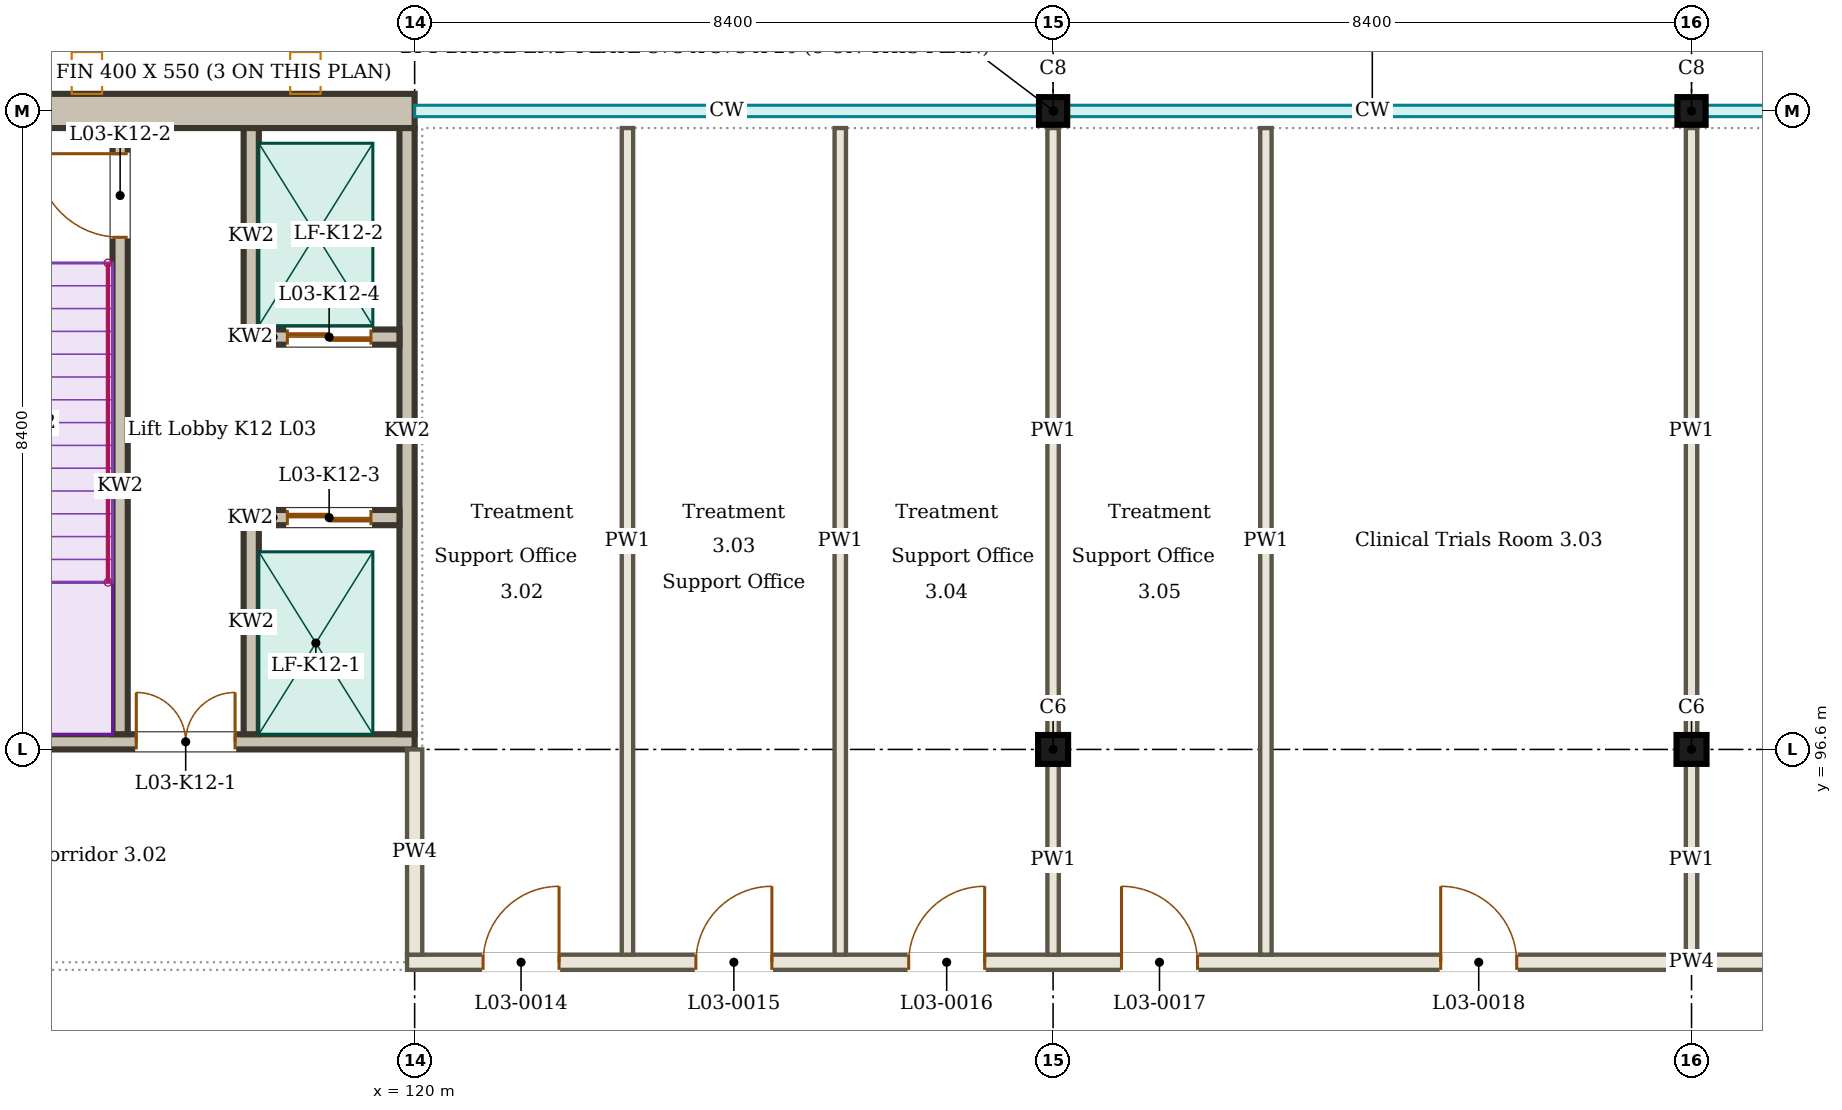
"""IFC4 building model, lengths in metres.
Left out: names, types, materials, properties, quantities, classifications, styles, units other than length and angle.
Written with IfcOpenShell. Run it as: python <this file> out.ifc"""

import sys

from ifc_helpers import new_model, si_unit, direction, frame, frame_2d, origin, origin_2d, place, context, subcontext, project, spatial, rectangle, i_section, extrude, element, fill, save


model = new_model("IFC4")
c1 = context("Model", 3, precision=1e-05, world=origin(), true_north=direction((0.0, 1.0)))
c2 = subcontext(c1, "Body", "Model", "MODEL_VIEW")
j1 = project(units=[si_unit("LENGTHUNIT", "METRE"), si_unit("PLANEANGLEUNIT", "RADIAN")], contexts=[c1])
p1 = place(None, origin())
s1 = spatial("IfcSite", under=j1, at=p1, CompositionType="ELEMENT")
p2 = place(p1, origin())
s2 = spatial("IfcBuilding", under=s1, at=p2, CompositionType="ELEMENT")
p3 = place(p2, frame((0.0, 0.0, 13.5)))
s3 = spatial("IfcBuildingStorey", under=s2, at=p3, CompositionType="ELEMENT", Elevation=13.5)
for number, where, z_axis, x_axis in (
    (1, (128.4, 96.6, 0.0), (0.0, 0.0, 1.0), (1.0, 0.0, 0.0)),
    (2, (136.8, 96.6, 0.0), (0.0, 0.0, 1.0), (1.0, 0.0, 0.0)),
):
    element("IfcColumn", number, at=place(p3, frame(where, z_axis=z_axis, x_axis=x_axis)), inside=s3, PredefinedType="COLUMN", context=c2, shape_type="SweptSolid", body=[
        extrude(i_section(OverallWidth=0.395, OverallDepth=0.38, WebThickness=0.019, FlangeThickness=0.03, FilletRadius=0.027, at=origin_2d()), origin(), (0.0, 0.0, 1.0), 4.5),
    ])
for number, where, z_axis, x_axis in (
    (3, (128.4, 105.0, 0.0), (0.0, 0.0, 1.0), (1.0, 0.0, 0.0)),
    (4, (136.8, 105.0, 0.0), (0.0, 0.0, 1.0), (1.0, 0.0, 0.0)),
):
    element("IfcColumn", number, at=place(p3, frame(where, z_axis=z_axis, x_axis=x_axis)), inside=s3, PredefinedType="COLUMN", context=c2, shape_type="SweptSolid", body=[
        extrude(i_section(OverallWidth=0.371, OverallDepth=0.364, WebThickness=0.013, FlangeThickness=0.022, FilletRadius=0.027, at=origin_2d()), origin(), (0.0, 0.0, 1.0), 4.5),
    ])
p4 = place(p3, frame((136.8, 105.16, 3.87), z_axis=(0.0, 0.0, 1.0), x_axis=(1.0, 0.0, 0.0)))
e5 = element("IfcWall", 5, at=p4, inside=s3, PredefinedType="SOLIDWALL", context=c2, shape_type="SweptSolid", body=[
    extrude(rectangle(XDim=8.4, YDim=0.13, at=frame_2d((4.2, 0.0))), origin(), (0.0, 0.0, 1.0), 0.63),
])
p5 = place(p3, frame((119.9, 93.8, 0.0), z_axis=(0.0, 0.0, 1.0), x_axis=(1.0, 0.0, 0.0)))
e6 = element("IfcWall", 6, at=p5, inside=s3, PredefinedType="PARTITIONING", context=c2, shape_type="SweptSolid", body=[
    extrude(rectangle(XDim=22.6, YDim=0.2, at=frame_2d((11.3, 0.0))), origin(), (0.0, 0.0, 1.0), 3.8),
])
p6 = place(p5, frame((1.0, 0.0, 0.0)))
e7 = element("IfcOpeningElement", 7, at=p6, cuts=e6, PredefinedType="OPENING", context=c2, shape_type="SweptSolid", body=[
    extrude(rectangle(XDim=1.0, YDim=2.1, at=frame_2d((0.5, 1.05))), frame((0.0, 0.11, 0.0), z_axis=(0.0, -1.0, 0.0), x_axis=(1.0, 0.0, 0.0)), (0.0, 0.0, 1.0), 0.22),
])
p7 = place(p5, frame((3.8, 0.0, 0.0)))
e8 = element("IfcOpeningElement", 8, at=p7, cuts=e6, PredefinedType="OPENING", context=c2, shape_type="SweptSolid", body=[
    extrude(rectangle(XDim=1.0, YDim=2.1, at=frame_2d((0.5, 1.05))), frame((0.0, 0.11, 0.0), z_axis=(0.0, -1.0, 0.0), x_axis=(1.0, 0.0, 0.0)), (0.0, 0.0, 1.0), 0.22),
])
p8 = place(p5, frame((6.6, 0.0, 0.0)))
e9 = element("IfcOpeningElement", 9, at=p8, cuts=e6, PredefinedType="OPENING", context=c2, shape_type="SweptSolid", body=[
    extrude(rectangle(XDim=1.0, YDim=2.1, at=frame_2d((0.5, 1.05))), frame((0.0, 0.11, 0.0), z_axis=(0.0, -1.0, 0.0), x_axis=(1.0, 0.0, 0.0)), (0.0, 0.0, 1.0), 0.22),
])
p9 = place(p5, frame((9.4, 0.0, 0.0)))
e10 = element("IfcOpeningElement", 10, at=p9, cuts=e6, PredefinedType="OPENING", context=c2, shape_type="SweptSolid", body=[
    extrude(rectangle(XDim=1.0, YDim=2.1, at=frame_2d((0.5, 1.05))), frame((0.0, 0.11, 0.0), z_axis=(0.0, -1.0, 0.0), x_axis=(1.0, 0.0, 0.0)), (0.0, 0.0, 1.0), 0.22),
])
p10 = place(p5, frame((13.6, 0.0, 0.0)))
e11 = element("IfcOpeningElement", 11, at=p10, cuts=e6, PredefinedType="OPENING", context=c2, shape_type="SweptSolid", body=[
    extrude(rectangle(XDim=1.0, YDim=2.1, at=frame_2d((0.5, 1.05))), frame((0.0, 0.11, 0.0), z_axis=(0.0, -1.0, 0.0), x_axis=(1.0, 0.0, 0.0)), (0.0, 0.0, 1.0), 0.22),
])
p11 = place(p5, frame((19.2, 0.0, 0.0)))
e12 = element("IfcOpeningElement", 12, at=p11, cuts=e6, PredefinedType="OPENING", context=c2, shape_type="SweptSolid", body=[
    extrude(rectangle(XDim=1.0, YDim=2.1, at=frame_2d((0.5, 1.05))), frame((0.0, 0.11, 0.0), z_axis=(0.0, -1.0, 0.0), x_axis=(1.0, 0.0, 0.0)), (0.0, 0.0, 1.0), 0.22),
])
p12 = place(p3, frame((120.0, 93.9, 0.0), z_axis=(0.0, 0.0, 1.0), x_axis=(0.0, 1.0, 0.0)))
e13 = element("IfcWall", 13, at=p12, inside=s3, PredefinedType="PARTITIONING", context=c2, shape_type="SweptSolid", body=[
    extrude(rectangle(XDim=2.7, YDim=0.2, at=frame_2d((1.35, 0.0))), origin(), (0.0, 0.0, 1.0), 3.8),
])
for number, where, z_axis, x_axis in (
    (14, (122.8, 93.9, 0.0), (0.0, 0.0, 1.0), (0.0, 1.0, 0.0)),
    (15, (125.6, 93.9, 0.0), (0.0, 0.0, 1.0), (0.0, 1.0, 0.0)),
):
    element("IfcWall", number, at=place(p3, frame(where, z_axis=z_axis, x_axis=x_axis)), inside=s3, PredefinedType="PARTITIONING", context=c2, shape_type="SweptSolid", body=[
        extrude(rectangle(XDim=10.875, YDim=0.15, at=frame_2d((5.438, 0.0))), origin(), (0.0, 0.0, 1.0), 3.8),
    ])
p13 = place(p3, frame((128.4, 93.9, 0.0), z_axis=(0.0, 0.0, 1.0), x_axis=(0.0, 1.0, 0.0)))
e16 = element("IfcWall", 16, at=p13, inside=s3, PredefinedType="PARTITIONING", context=c2, shape_type="SweptSolid", body=[
    extrude(rectangle(XDim=2.503, YDim=0.15, at=frame_2d((1.251, 0.0))), origin(), (0.0, 0.0, 1.0), 3.8),
])
p14 = place(p3, frame((128.4, 96.798, 0.0), z_axis=(0.0, 0.0, 1.0), x_axis=(0.0, 1.0, 0.0)))
e17 = element("IfcWall", 17, at=p14, inside=s3, PredefinedType="PARTITIONING", context=c2, shape_type="SweptSolid", body=[
    extrude(rectangle(XDim=7.977, YDim=0.15, at=frame_2d((3.989, 0.0))), origin(), (0.0, 0.0, 1.0), 3.8),
])
p15 = place(p3, frame((131.2, 93.9, 0.0), z_axis=(0.0, 0.0, 1.0), x_axis=(0.0, 1.0, 0.0)))
e18 = element("IfcWall", 18, at=p15, inside=s3, PredefinedType="PARTITIONING", context=c2, shape_type="SweptSolid", body=[
    extrude(rectangle(XDim=10.875, YDim=0.15, at=frame_2d((5.438, 0.0))), origin(), (0.0, 0.0, 1.0), 3.8),
])
p16 = place(p3, frame((136.8, 93.9, 0.0), z_axis=(0.0, 0.0, 1.0), x_axis=(0.0, 1.0, 0.0)))
e19 = element("IfcWall", 19, at=p16, inside=s3, PredefinedType="PARTITIONING", context=c2, shape_type="SweptSolid", body=[
    extrude(rectangle(XDim=2.503, YDim=0.15, at=frame_2d((1.251, 0.0))), origin(), (0.0, 0.0, 1.0), 3.8),
])
p17 = place(p3, frame((136.8, 96.798, 0.0), z_axis=(0.0, 0.0, 1.0), x_axis=(0.0, 1.0, 0.0)))
e20 = element("IfcWall", 20, at=p17, inside=s3, PredefinedType="PARTITIONING", context=c2, shape_type="SweptSolid", body=[
    extrude(rectangle(XDim=7.977, YDim=0.15, at=frame_2d((3.989, 0.0))), origin(), (0.0, 0.0, 1.0), 3.8),
])
p18 = place(p3, frame((111.825, 96.7, 0.0), z_axis=(0.0, 0.0, 1.0), x_axis=(1.0, 0.0, 0.0)))
e21 = element("IfcWall", 21, at=p18, inside=s3, PredefinedType="SOLIDWALL", context=c2, shape_type="SweptSolid", body=[
    extrude(rectangle(XDim=8.175, YDim=0.2, at=frame_2d((4.087, 0.0))), origin(), (0.0, 0.0, 1.0), 4.5),
])
p19 = place(p18, frame((4.512, 0.0, 0.0)))
e22 = element("IfcOpeningElement", 22, at=p19, cuts=e21, PredefinedType="OPENING", context=c2, shape_type="SweptSolid", body=[
    extrude(rectangle(XDim=1.3, YDim=2.1, at=frame_2d((0.65, 1.05))), frame((0.0, 0.11, 0.0), z_axis=(0.0, -1.0, 0.0), x_axis=(1.0, 0.0, 0.0)), (0.0, 0.0, 1.0), 0.22),
])
p20 = place(p3, frame((111.375, 105.0, 0.0), z_axis=(0.0, 0.0, 1.0), x_axis=(1.0, 0.0, 0.0)))
e23 = element("IfcWall", 23, at=p20, inside=s3, PredefinedType="SOLIDWALL", context=c2, shape_type="SweptSolid", body=[
    extrude(rectangle(XDim=8.625, YDim=0.45, at=frame_2d((4.312, 0.0))), origin(), (0.0, 0.0, 1.0), 4.5),
])
p21 = place(p3, frame((119.9, 96.8, 0.0), z_axis=(0.0, 0.0, 1.0), x_axis=(0.0, 1.0, 0.0)))
e24 = element("IfcWall", 24, at=p21, inside=s3, PredefinedType="SOLIDWALL", context=c2, shape_type="SweptSolid", body=[
    extrude(rectangle(XDim=7.975, YDim=0.2, at=frame_2d((3.987, 0.0))), origin(), (0.0, 0.0, 1.0), 4.5),
])
p22 = place(p3, frame((116.125, 96.8, 0.0), z_axis=(0.0, 0.0, 1.0), x_axis=(0.0, 1.0, 0.0)))
e25 = element("IfcWall", 25, at=p22, inside=s3, PredefinedType="SOLIDWALL", context=c2, shape_type="SweptSolid", body=[
    extrude(rectangle(XDim=7.975, YDim=0.2, at=frame_2d((3.987, 0.0))), origin(), (0.0, 0.0, 1.0), 4.5),
])
p23 = place(p22, frame((6.538, 0.0, 0.0)))
e26 = element("IfcOpeningElement", 26, at=p23, cuts=e25, PredefinedType="OPENING", context=c2, shape_type="SweptSolid", body=[
    extrude(rectangle(XDim=1.1, YDim=2.1, at=frame_2d((0.55, 1.05))), frame((0.0, 0.11, 0.0), z_axis=(0.0, -1.0, 0.0), x_axis=(1.0, 0.0, 0.0)), (0.0, 0.0, 1.0), 0.22),
])
p24 = place(p3, frame((117.85, 96.8, 0.0), z_axis=(0.0, 0.0, 1.0), x_axis=(0.0, 1.0, 0.0)))
e27 = element("IfcWall", 27, at=p24, inside=s3, PredefinedType="SOLIDWALL", context=c2, shape_type="SweptSolid", body=[
    extrude(rectangle(XDim=2.95, YDim=0.2, at=frame_2d((1.475, 0.0))), origin(), (0.0, 0.0, 1.0), 4.5),
])
p25 = place(p3, frame((117.85, 101.925, 0.0), z_axis=(0.0, 0.0, 1.0), x_axis=(0.0, 1.0, 0.0)))
e28 = element("IfcWall", 28, at=p25, inside=s3, PredefinedType="SOLIDWALL", context=c2, shape_type="SweptSolid", body=[
    extrude(rectangle(XDim=2.85, YDim=0.2, at=frame_2d((1.425, 0.0))), origin(), (0.0, 0.0, 1.0), 4.5),
])
p26 = place(p3, frame((117.95, 99.65, 0.0), z_axis=(0.0, 0.0, 1.0), x_axis=(1.0, 0.0, 0.0)))
e29 = element("IfcWall", 29, at=p26, inside=s3, PredefinedType="SOLIDWALL", context=c2, shape_type="SweptSolid", body=[
    extrude(rectangle(XDim=1.85, YDim=0.2, at=frame_2d((0.925, 0.0))), origin(), (0.0, 0.0, 1.0), 4.5),
])
p27 = place(p26, frame((0.375, 0.0, 0.0)))
e30 = element("IfcOpeningElement", 30, at=p27, cuts=e29, PredefinedType="OPENING", context=c2, shape_type="SweptSolid", body=[
    extrude(rectangle(XDim=1.1, YDim=2.1, at=frame_2d((0.55, 1.05))), frame((0.0, 0.11, 0.0), z_axis=(0.0, -1.0, 0.0), x_axis=(1.0, 0.0, 0.0)), (0.0, 0.0, 1.0), 0.22),
])
p28 = place(p3, frame((117.95, 102.025, 0.0), z_axis=(0.0, 0.0, 1.0), x_axis=(1.0, 0.0, 0.0)))
e31 = element("IfcWall", 31, at=p28, inside=s3, PredefinedType="SOLIDWALL", context=c2, shape_type="SweptSolid", body=[
    extrude(rectangle(XDim=1.85, YDim=0.2, at=frame_2d((0.925, 0.0))), origin(), (0.0, 0.0, 1.0), 4.5),
])
p29 = place(p28, frame((0.375, 0.0, 0.0)))
e32 = element("IfcOpeningElement", 32, at=p29, cuts=e31, PredefinedType="OPENING", context=c2, shape_type="SweptSolid", body=[
    extrude(rectangle(XDim=1.1, YDim=2.1, at=frame_2d((0.55, 1.05))), frame((0.0, 0.11, 0.0), z_axis=(0.0, -1.0, 0.0), x_axis=(1.0, 0.0, 0.0)), (0.0, 0.0, 1.0), 0.22),
])
p30 = place(p6, origin())
e33 = element("IfcDoor", 33, at=p30, inside=s3, OperationType="SINGLE_SWING_RIGHT", PredefinedType="DOOR", context=c2, shape_type="SweptSolid", body=[
    extrude(rectangle(XDim=1.0, YDim=2.1, at=frame_2d((0.5, 1.05))), frame((0.0, 0.025, 0.0), z_axis=(0.0, -1.0, 0.0), x_axis=(1.0, 0.0, 0.0)), (0.0, 0.0, 1.0), 0.05),
])
fill(e7, e33)
p31 = place(p7, origin())
e34 = element("IfcDoor", 34, at=p31, inside=s3, OperationType="SINGLE_SWING_RIGHT", PredefinedType="DOOR", context=c2, shape_type="SweptSolid", body=[
    extrude(rectangle(XDim=1.0, YDim=2.1, at=frame_2d((0.5, 1.05))), frame((0.0, 0.025, 0.0), z_axis=(0.0, -1.0, 0.0), x_axis=(1.0, 0.0, 0.0)), (0.0, 0.0, 1.0), 0.05),
])
fill(e8, e34)
p32 = place(p8, origin())
e35 = element("IfcDoor", 35, at=p32, inside=s3, OperationType="SINGLE_SWING_RIGHT", PredefinedType="DOOR", context=c2, shape_type="SweptSolid", body=[
    extrude(rectangle(XDim=1.0, YDim=2.1, at=frame_2d((0.5, 1.05))), frame((0.0, 0.025, 0.0), z_axis=(0.0, -1.0, 0.0), x_axis=(1.0, 0.0, 0.0)), (0.0, 0.0, 1.0), 0.05),
])
fill(e9, e35)
p33 = place(p9, origin())
e36 = element("IfcDoor", 36, at=p33, inside=s3, OperationType="SINGLE_SWING_LEFT", PredefinedType="DOOR", context=c2, shape_type="SweptSolid", body=[
    extrude(rectangle(XDim=1.0, YDim=2.1, at=frame_2d((0.5, 1.05))), frame((0.0, 0.025, 0.0), z_axis=(0.0, -1.0, 0.0), x_axis=(1.0, 0.0, 0.0)), (0.0, 0.0, 1.0), 0.05),
])
fill(e10, e36)
p34 = place(p10, origin())
e37 = element("IfcDoor", 37, at=p34, inside=s3, OperationType="SINGLE_SWING_LEFT", PredefinedType="DOOR", context=c2, shape_type="SweptSolid", body=[
    extrude(rectangle(XDim=1.0, YDim=2.1, at=frame_2d((0.5, 1.05))), frame((0.0, 0.025, 0.0), z_axis=(0.0, -1.0, 0.0), x_axis=(1.0, 0.0, 0.0)), (0.0, 0.0, 1.0), 0.05),
])
fill(e11, e37)
p35 = place(p19, origin())
e38 = element("IfcDoor", 38, at=p35, inside=s3, OperationType="DOUBLE_DOOR_DOUBLE_SWING", PredefinedType="DOOR", context=c2, shape_type="SweptSolid", body=[
    extrude(rectangle(XDim=1.3, YDim=2.1, at=frame_2d((0.65, 1.05))), frame((0.0, 0.025, 0.0), z_axis=(0.0, -1.0, 0.0), x_axis=(1.0, 0.0, 0.0)), (0.0, 0.0, 1.0), 0.05),
])
fill(e22, e38)
p36 = place(p23, origin())
e39 = element("IfcDoor", 39, at=p36, inside=s3, OperationType="SINGLE_SWING_RIGHT", PredefinedType="DOOR", context=c2, shape_type="SweptSolid", body=[
    extrude(rectangle(XDim=1.1, YDim=2.1, at=frame_2d((0.55, 1.05))), frame((0.0, 0.025, 0.0), z_axis=(0.0, -1.0, 0.0), x_axis=(1.0, 0.0, 0.0)), (0.0, 0.0, 1.0), 0.05),
])
fill(e26, e39)
p37 = place(p27, origin())
e40 = element("IfcDoor", 40, at=p37, inside=s3, OperationType="DOUBLE_DOOR_SLIDING", PredefinedType="DOOR", context=c2, shape_type="SweptSolid", body=[
    extrude(rectangle(XDim=1.1, YDim=2.1, at=frame_2d((0.55, 1.05))), frame((0.0, 0.025, 0.0), z_axis=(0.0, -1.0, 0.0), x_axis=(1.0, 0.0, 0.0)), (0.0, 0.0, 1.0), 0.05),
])
fill(e30, e40)
p38 = place(p29, origin())
e41 = element("IfcDoor", 41, at=p38, inside=s3, OperationType="DOUBLE_DOOR_SLIDING", PredefinedType="DOOR", context=c2, shape_type="SweptSolid", body=[
    extrude(rectangle(XDim=1.1, YDim=2.1, at=frame_2d((0.55, 1.05))), frame((0.0, 0.025, 0.0), z_axis=(0.0, -1.0, 0.0), x_axis=(1.0, 0.0, 0.0)), (0.0, 0.0, 1.0), 0.05),
])
fill(e32, e41)
save(model, sys.argv[1])
